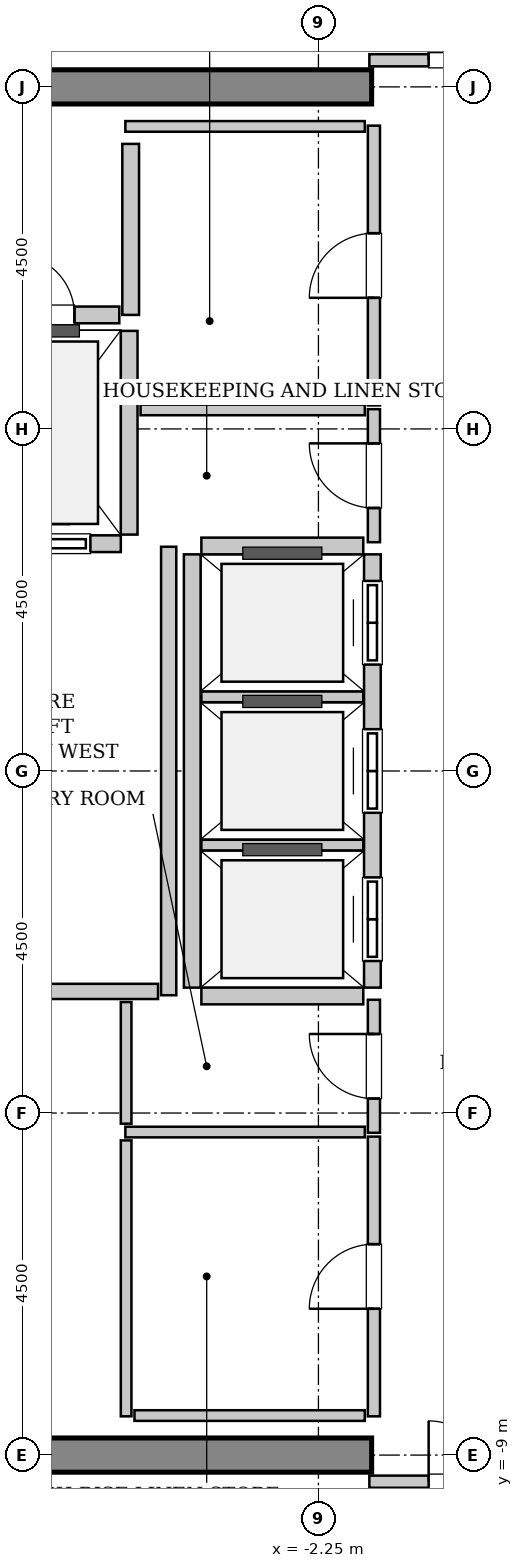
"""IFC4 building model, lengths in metres.
Left out: names, types, materials, properties, quantities, classifications, styles, units other than length and angle.
Written with IfcOpenShell. Run it as: python <this file> out.ifc"""

import sys

from ifc_helpers import new_model, si_unit, direction, frame, frame_2d, origin, place, context, subcontext, project, spatial, rectangle, extrude, source, transform, mapped, element, fill, save


model = new_model("IFC4")
c1 = context("Model", 3, precision=1e-05, world=origin(), true_north=direction((0.0, 1.0)))
c2 = subcontext(c1, "Body", "Model", "MODEL_VIEW")
j1 = project(units=[si_unit("LENGTHUNIT", "METRE"), si_unit("PLANEANGLEUNIT", "RADIAN")], contexts=[c1])
p1 = place(None, origin())
s1 = spatial("IfcSite", under=j1, at=p1, CompositionType="ELEMENT")
p2 = place(p1, origin())
s2 = spatial("IfcBuilding", under=s1, at=p2, CompositionType="ELEMENT")
p3 = place(p2, frame((0.0, 0.0, 279.8)))
s3 = spatial("IfcBuildingStorey", under=s2, at=p3, CompositionType="ELEMENT", Elevation=279.8)
m1 = source(origin(), c2, "Body", "SweptSolid", [
    extrude(rectangle(XDim=9.925, YDim=0.45, at=frame_2d((4.962, 0.0))), origin(), (0.0, 0.0, 1.0), 3.8),
])
for number, where, z_axis, x_axis in (
    (1, (-11.475, 9.0, 0.0), (0.0, 0.0, 1.0), (1.0, 0.0, 0.0)),
    (2, (-11.475, -9.0, 0.0), (0.0, 0.0, 1.0), (1.0, 0.0, 0.0)),
):
    element("IfcWall", number, at=place(p3, frame(where, z_axis=z_axis, x_axis=x_axis)), inside=s3, PredefinedType="SHEAR", context=c2, shape_type="MappedRepresentation", body=[
        mapped(m1, transform((0.0, 0.0, 0.0), x_axis=(1.0, 0.0, 0.0), y_axis=(0.0, 1.0, 0.0), z_axis=(0.0, 0.0, 1.0), scale=1.0)),
    ])
m2 = source(origin(), c2, "Body", "SweptSolid", [
    extrude(rectangle(XDim=2.0, YDim=0.22, at=frame_2d((1.0, 0.0))), origin(), (0.0, 0.0, 1.0), 3.535),
])
p4 = place(p3, frame((-6.85, 2.99, 0.0), z_axis=(0.0, 0.0, 1.0), x_axis=(1.0, 0.0, 0.0)))
e3 = element("IfcWall", 3, at=p4, inside=s3, PredefinedType="SOLIDWALL", context=c2, shape_type="MappedRepresentation", body=[
    mapped(m2, transform((0.0, 0.0, 0.0), x_axis=(1.0, 0.0, 0.0), y_axis=(0.0, 1.0, 0.0), z_axis=(0.0, 0.0, 1.0), scale=1.0)),
])
p5 = place(p4, frame((0.4, 0.0, 0.0)))
e4 = element("IfcOpeningElement", 4, at=p5, cuts=e3, PredefinedType="OPENING", context=c2, shape_type="SweptSolid", body=[
    extrude(rectangle(XDim=1.2, YDim=2.2, at=frame_2d((0.6, 1.1))), frame((0.0, 0.12, 0.0), z_axis=(0.0, -1.0, 0.0), x_axis=(1.0, 0.0, 0.0)), (0.0, 0.0, 1.0), 0.24),
])
m3 = source(origin(), c2, "Body", "SweptSolid", [
    extrude(rectangle(XDim=2.68, YDim=0.22, at=frame_2d((1.34, 0.0))), origin(), (0.0, 0.0, 1.0), 3.535),
])
p6 = place(p3, frame((-4.74, 3.11, 0.0), z_axis=(0.0, 0.0, 1.0), x_axis=(0.0, 1.0, 0.0)))
e5 = element("IfcWall", 5, at=p6, inside=s3, PredefinedType="SOLIDWALL", context=c2, shape_type="MappedRepresentation", body=[
    mapped(m3, transform((0.0, 0.0, 0.0), x_axis=(1.0, 0.0, 0.0), y_axis=(0.0, 1.0, 0.0), z_axis=(0.0, 0.0, 1.0), scale=1.0)),
])
m4 = source(origin(), c2, "Body", "SweptSolid", [
    extrude(rectangle(XDim=5.7, YDim=0.22, at=frame_2d((2.85, 0.0))), origin(), (0.0, 0.0, 1.0), 3.535),
])
p7 = place(p3, frame((-1.54, -2.85, 0.0), z_axis=(0.0, 0.0, 1.0), x_axis=(0.0, 1.0, 0.0)))
e6 = element("IfcWall", 6, at=p7, inside=s3, PredefinedType="SOLIDWALL", context=c2, shape_type="MappedRepresentation", body=[
    mapped(m4, transform((0.0, 0.0, 0.0), x_axis=(1.0, 0.0, 0.0), y_axis=(0.0, 1.0, 0.0), z_axis=(0.0, 0.0, 1.0), scale=1.0)),
])
p8 = place(p7, frame((0.35, 0.0, 0.0)))
e7 = element("IfcOpeningElement", 7, at=p8, cuts=e6, PredefinedType="OPENING", context=c2, shape_type="SweptSolid", body=[
    extrude(rectangle(XDim=1.1, YDim=2.2, at=frame_2d((0.55, 1.1))), frame((0.0, 0.12, 0.0), z_axis=(0.0, -1.0, 0.0), x_axis=(1.0, 0.0, 0.0)), (0.0, 0.0, 1.0), 0.24),
])
p9 = place(p7, frame((2.3, 0.0, 0.0)))
e8 = element("IfcOpeningElement", 8, at=p9, cuts=e6, PredefinedType="OPENING", context=c2, shape_type="SweptSolid", body=[
    extrude(rectangle(XDim=1.1, YDim=2.2, at=frame_2d((0.55, 1.1))), frame((0.0, 0.12, 0.0), z_axis=(0.0, -1.0, 0.0), x_axis=(1.0, 0.0, 0.0)), (0.0, 0.0, 1.0), 0.24),
])
p10 = place(p7, frame((4.25, 0.0, 0.0)))
e9 = element("IfcOpeningElement", 9, at=p10, cuts=e6, PredefinedType="OPENING", context=c2, shape_type="SweptSolid", body=[
    extrude(rectangle(XDim=1.1, YDim=2.2, at=frame_2d((0.55, 1.1))), frame((0.0, 0.12, 0.0), z_axis=(0.0, -1.0, 0.0), x_axis=(1.0, 0.0, 0.0)), (0.0, 0.0, 1.0), 0.24),
])
p11 = place(p3, frame((-3.91, 2.85, 0.0), z_axis=(0.0, 0.0, 1.0), x_axis=(0.0, -1.0, 0.0)))
e10 = element("IfcWall", 10, at=p11, inside=s3, PredefinedType="SOLIDWALL", context=c2, shape_type="MappedRepresentation", body=[
    mapped(m4, transform((0.0, 0.0, 0.0), x_axis=(1.0, 0.0, 0.0), y_axis=(0.0, 1.0, 0.0), z_axis=(0.0, 0.0, 1.0), scale=1.0)),
])
m5 = source(origin(), c2, "Body", "SweptSolid", [
    extrude(rectangle(XDim=2.13, YDim=0.22, at=frame_2d((1.065, 0.0))), origin(), (0.0, 0.0, 1.0), 3.535),
])
p12 = place(p3, frame((-3.79, -2.96, 0.0), z_axis=(0.0, 0.0, 1.0), x_axis=(1.0, 0.0, 0.0)))
e11 = element("IfcWall", 11, at=p12, inside=s3, PredefinedType="SOLIDWALL", context=c2, shape_type="MappedRepresentation", body=[
    mapped(m5, transform((0.0, 0.0, 0.0), x_axis=(1.0, 0.0, 0.0), y_axis=(0.0, 1.0, 0.0), z_axis=(0.0, 0.0, 1.0), scale=1.0)),
])
m6 = source(origin(), c2, "Body", "SweptSolid", [
    extrude(rectangle(XDim=2.13, YDim=0.14, at=frame_2d((1.065, 0.0))), origin(), (0.0, 0.0, 1.0), 3.535),
])
for number, where, z_axis, x_axis in (
    (12, (-3.79, -0.975, 0.0), (0.0, 0.0, 1.0), (1.0, 0.0, 0.0)),
    (13, (-3.79, 0.975, 0.0), (0.0, 0.0, 1.0), (1.0, 0.0, 0.0)),
):
    element("IfcWall", number, at=place(p3, frame(where, z_axis=z_axis, x_axis=x_axis)), inside=s3, PredefinedType="PARTITIONING", context=c2, shape_type="MappedRepresentation", body=[
        mapped(m6, transform((0.0, 0.0, 0.0), x_axis=(1.0, 0.0, 0.0), y_axis=(0.0, 1.0, 0.0), z_axis=(0.0, 0.0, 1.0), scale=1.0)),
    ])
p13 = place(p3, frame((-1.66, 2.96, 0.0), z_axis=(0.0, 0.0, 1.0), x_axis=(-1.0, 0.0, 0.0)))
e14 = element("IfcWall", 14, at=p13, inside=s3, PredefinedType="SOLIDWALL", context=c2, shape_type="MappedRepresentation", body=[
    mapped(m5, transform((0.0, 0.0, 0.0), x_axis=(1.0, 0.0, 0.0), y_axis=(0.0, 1.0, 0.0), z_axis=(0.0, 0.0, 1.0), scale=1.0)),
])
m7 = source(origin(), c2, "Body", "SweptSolid", [
    extrude(rectangle(XDim=2.25, YDim=0.22, at=frame_2d((1.125, 0.0))), origin(), (0.0, 0.0, 1.0), 3.535),
])
p14 = place(p3, frame((-4.72, 6.0, 0.0), z_axis=(0.0, 0.0, 1.0), x_axis=(0.0, 1.0, 0.0)))
e15 = element("IfcWall", 15, at=p14, inside=s3, PredefinedType="SOLIDWALL", context=c2, shape_type="MappedRepresentation", body=[
    mapped(m7, transform((0.0, 0.0, 0.0), x_axis=(1.0, 0.0, 0.0), y_axis=(0.0, 1.0, 0.0), z_axis=(0.0, 0.0, 1.0), scale=1.0)),
])
m8 = source(origin(), c2, "Body", "SweptSolid", [
    extrude(rectangle(XDim=1.98, YDim=0.22, at=frame_2d((0.99, 0.0))), origin(), (0.0, 0.0, 1.0), 3.535),
])
p15 = place(p3, frame((-6.85, 6.0, 0.0), z_axis=(0.0, 0.0, 1.0), x_axis=(1.0, 0.0, 0.0)))
e16 = element("IfcWall", 16, at=p15, inside=s3, PredefinedType="SOLIDWALL", context=c2, shape_type="MappedRepresentation", body=[
    mapped(m8, transform((0.0, 0.0, 0.0), x_axis=(1.0, 0.0, 0.0), y_axis=(0.0, 1.0, 0.0), z_axis=(0.0, 0.0, 1.0), scale=1.0)),
])
p16 = place(p15, frame((0.59, 0.0, 0.0)))
e17 = element("IfcOpeningElement", 17, at=p16, cuts=e16, PredefinedType="OPENING", context=c2, shape_type="SweptSolid", body=[
    extrude(rectangle(XDim=0.8, YDim=2.0, at=frame_2d((0.4, 1.0))), frame((0.0, 0.12, 0.0), z_axis=(0.0, -1.0, 0.0), x_axis=(1.0, 0.0, 0.0)), (0.0, 0.0, 1.0), 0.24),
])
m9 = source(origin(), c2, "Body", "SweptSolid", [
    extrude(rectangle(XDim=5.9, YDim=0.2, at=frame_2d((2.95, 0.0))), origin(), (0.0, 0.0, 1.0), 3.535),
])
p17 = place(p3, frame((-4.22, -2.95, 0.0), z_axis=(0.0, 0.0, 1.0), x_axis=(0.0, 1.0, 0.0)))
e18 = element("IfcWall", 18, at=p17, inside=s3, PredefinedType="PARTITIONING", context=c2, shape_type="MappedRepresentation", body=[
    mapped(m9, transform((0.0, 0.0, 0.0), x_axis=(1.0, 0.0, 0.0), y_axis=(0.0, 1.0, 0.0), z_axis=(0.0, 0.0, 1.0), scale=1.0)),
])
m10 = source(origin(), c2, "Body", "SweptSolid", [
    extrude(rectangle(XDim=2.9, YDim=0.2, at=frame_2d((1.45, 0.0))), origin(), (0.0, 0.0, 1.0), 3.535),
])
p18 = place(p3, frame((-7.26, -2.9, 0.0), z_axis=(0.0, 0.0, 1.0), x_axis=(1.0, 0.0, 0.0)))
e19 = element("IfcWall", 19, at=p18, inside=s3, PredefinedType="PARTITIONING", context=c2, shape_type="MappedRepresentation", body=[
    mapped(m10, transform((0.0, 0.0, 0.0), x_axis=(1.0, 0.0, 0.0), y_axis=(0.0, 1.0, 0.0), z_axis=(0.0, 0.0, 1.0), scale=1.0)),
])
m11 = source(origin(), c2, "Body", "SweptSolid", [
    extrude(rectangle(XDim=3.16, YDim=0.16, at=frame_2d((1.58, 0.0))), origin(), (0.0, 0.0, 1.0), 2.625),
])
p19 = place(p3, frame((-1.58, 9.35, 0.0), z_axis=(0.0, 0.0, 1.0), x_axis=(1.0, 0.0, 0.0)))
e20 = element("IfcWall", 20, at=p19, inside=s3, PredefinedType="PARTITIONING", context=c2, shape_type="MappedRepresentation", body=[
    mapped(m11, transform((0.0, 0.0, 0.0), x_axis=(1.0, 0.0, 0.0), y_axis=(0.0, 1.0, 0.0), z_axis=(0.0, 0.0, 1.0), scale=1.0)),
])
p20 = place(p19, frame((0.78, 0.0, 0.0)))
e21 = element("IfcOpeningElement", 21, at=p20, cuts=e20, PredefinedType="OPENING", context=c2, shape_type="SweptSolid", body=[
    extrude(rectangle(XDim=1.6, YDim=2.3, at=frame_2d((0.8, 1.15))), frame((0.0, 0.09, 0.0), z_axis=(0.0, -1.0, 0.0), x_axis=(1.0, 0.0, 0.0)), (0.0, 0.0, 1.0), 0.18),
])
p21 = place(p3, frame((-1.58, -9.35, 0.0), z_axis=(0.0, 0.0, 1.0), x_axis=(1.0, 0.0, 0.0)))
e22 = element("IfcWall", 22, at=p21, inside=s3, PredefinedType="PARTITIONING", context=c2, shape_type="MappedRepresentation", body=[
    mapped(m11, transform((0.0, 0.0, 0.0), x_axis=(1.0, 0.0, 0.0), y_axis=(0.0, 1.0, 0.0), z_axis=(0.0, 0.0, 1.0), scale=1.0)),
])
p22 = place(p21, frame((0.78, 0.0, 0.0)))
e23 = element("IfcOpeningElement", 23, at=p22, cuts=e22, PredefinedType="OPENING", context=c2, shape_type="SweptSolid", body=[
    extrude(rectangle(XDim=1.6, YDim=2.3, at=frame_2d((0.8, 1.15))), frame((0.0, 0.09, 0.0), z_axis=(0.0, -1.0, 0.0), x_axis=(1.0, 0.0, 0.0)), (0.0, 0.0, 1.0), 0.18),
])
m12 = source(origin(), c2, "Body", "SweptSolid", [
    extrude(rectangle(XDim=1.75, YDim=0.16, at=frame_2d((0.875, 0.0))), origin(), (0.0, 0.0, 1.0), 3.535),
])
p23 = place(p3, frame((-1.52, 3.01, 0.0), z_axis=(0.0, 0.0, 1.0), x_axis=(0.0, 1.0, 0.0)))
e24 = element("IfcWall", 24, at=p23, inside=s3, PredefinedType="PARTITIONING", context=c2, shape_type="MappedRepresentation", body=[
    mapped(m12, transform((0.0, 0.0, 0.0), x_axis=(1.0, 0.0, 0.0), y_axis=(0.0, 1.0, 0.0), z_axis=(0.0, 0.0, 1.0), scale=1.0)),
])
p24 = place(p23, frame((0.45, 0.0, 0.0)))
e25 = element("IfcOpeningElement", 25, at=p24, cuts=e24, PredefinedType="OPENING", context=c2, shape_type="SweptSolid", body=[
    extrude(rectangle(XDim=0.85, YDim=2.1, at=frame_2d((0.425, 1.05))), frame((0.0, 0.09, 0.0), z_axis=(0.0, -1.0, 0.0), x_axis=(1.0, 0.0, 0.0)), (0.0, 0.0, 1.0), 0.18),
])
m13 = source(origin(), c2, "Body", "SweptSolid", [
    extrude(rectangle(XDim=2.95, YDim=0.14, at=frame_2d((1.475, 0.0))), origin(), (0.0, 0.0, 1.0), 3.535),
])
p25 = place(p3, frame((-4.59, 4.75, 0.0), z_axis=(0.0, 0.0, 1.0), x_axis=(1.0, 0.0, 0.0)))
e26 = element("IfcWall", 26, at=p25, inside=s3, PredefinedType="PARTITIONING", context=c2, shape_type="MappedRepresentation", body=[
    mapped(m13, transform((0.0, 0.0, 0.0), x_axis=(1.0, 0.0, 0.0), y_axis=(0.0, 1.0, 0.0), z_axis=(0.0, 0.0, 1.0), scale=1.0)),
])
m14 = source(origin(), c2, "Body", "SweptSolid", [
    extrude(rectangle(XDim=3.68, YDim=0.16, at=frame_2d((1.84, 0.0))), origin(), (0.0, 0.0, 1.0), 3.535),
])
p26 = place(p3, frame((-1.52, 4.81, 0.0), z_axis=(0.0, 0.0, 1.0), x_axis=(0.0, 1.0, 0.0)))
e27 = element("IfcWall", 27, at=p26, inside=s3, PredefinedType="PARTITIONING", context=c2, shape_type="MappedRepresentation", body=[
    mapped(m14, transform((0.0, 0.0, 0.0), x_axis=(1.0, 0.0, 0.0), y_axis=(0.0, 1.0, 0.0), z_axis=(0.0, 0.0, 1.0), scale=1.0)),
])
p27 = place(p26, frame((1.415, 0.0, 0.0)))
e28 = element("IfcOpeningElement", 28, at=p27, cuts=e27, PredefinedType="OPENING", context=c2, shape_type="SweptSolid", body=[
    extrude(rectangle(XDim=0.85, YDim=2.1, at=frame_2d((0.425, 1.05))), frame((0.0, 0.09, 0.0), z_axis=(0.0, -1.0, 0.0), x_axis=(1.0, 0.0, 0.0)), (0.0, 0.0, 1.0), 0.18),
])
m15 = source(origin(), c2, "Body", "SweptSolid", [
    extrude(rectangle(XDim=3.15, YDim=0.14, at=frame_2d((1.575, 0.0))), origin(), (0.0, 0.0, 1.0), 3.535),
])
p28 = place(p3, frame((-4.79, 8.48, 0.0), z_axis=(0.0, 0.0, 1.0), x_axis=(1.0, 0.0, 0.0)))
e29 = element("IfcWall", 29, at=p28, inside=s3, PredefinedType="PARTITIONING", context=c2, shape_type="MappedRepresentation", body=[
    mapped(m15, transform((0.0, 0.0, 0.0), x_axis=(1.0, 0.0, 0.0), y_axis=(0.0, 1.0, 0.0), z_axis=(0.0, 0.0, 1.0), scale=1.0)),
])
p29 = place(p3, frame((-1.52, -4.76, 0.0), z_axis=(0.0, 0.0, 1.0), x_axis=(0.0, 1.0, 0.0)))
e30 = element("IfcWall", 30, at=p29, inside=s3, PredefinedType="PARTITIONING", context=c2, shape_type="MappedRepresentation", body=[
    mapped(m12, transform((0.0, 0.0, 0.0), x_axis=(1.0, 0.0, 0.0), y_axis=(0.0, 1.0, 0.0), z_axis=(0.0, 0.0, 1.0), scale=1.0)),
])
p30 = place(p29, frame((0.45, 0.0, 0.0)))
e31 = element("IfcOpeningElement", 31, at=p30, cuts=e30, PredefinedType="OPENING", context=c2, shape_type="SweptSolid", body=[
    extrude(rectangle(XDim=0.85, YDim=2.1, at=frame_2d((0.425, 1.05))), frame((0.0, 0.09, 0.0), z_axis=(0.0, -1.0, 0.0), x_axis=(1.0, 0.0, 0.0)), (0.0, 0.0, 1.0), 0.18),
])
p31 = place(p3, frame((-4.79, -4.75, 0.0), z_axis=(0.0, 0.0, 1.0), x_axis=(1.0, 0.0, 0.0)))
e32 = element("IfcWall", 32, at=p31, inside=s3, PredefinedType="PARTITIONING", context=c2, shape_type="MappedRepresentation", body=[
    mapped(m15, transform((0.0, 0.0, 0.0), x_axis=(1.0, 0.0, 0.0), y_axis=(0.0, 1.0, 0.0), z_axis=(0.0, 0.0, 1.0), scale=1.0)),
])
m16 = source(origin(), c2, "Body", "SweptSolid", [
    extrude(rectangle(XDim=1.6, YDim=0.14, at=frame_2d((0.8, 0.0))), origin(), (0.0, 0.0, 1.0), 3.535),
])
p32 = place(p3, frame((-4.78, -4.64, 0.0), z_axis=(0.0, 0.0, 1.0), x_axis=(0.0, 1.0, 0.0)))
e33 = element("IfcWall", 33, at=p32, inside=s3, PredefinedType="PARTITIONING", context=c2, shape_type="MappedRepresentation", body=[
    mapped(m16, transform((0.0, 0.0, 0.0), x_axis=(1.0, 0.0, 0.0), y_axis=(0.0, 1.0, 0.0), z_axis=(0.0, 0.0, 1.0), scale=1.0)),
])
p33 = place(p3, frame((-1.52, -8.49, 0.0), z_axis=(0.0, 0.0, 1.0), x_axis=(0.0, 1.0, 0.0)))
e34 = element("IfcWall", 34, at=p33, inside=s3, PredefinedType="PARTITIONING", context=c2, shape_type="MappedRepresentation", body=[
    mapped(m14, transform((0.0, 0.0, 0.0), x_axis=(1.0, 0.0, 0.0), y_axis=(0.0, 1.0, 0.0), z_axis=(0.0, 0.0, 1.0), scale=1.0)),
])
p34 = place(p33, frame((1.415, 0.0, 0.0)))
e35 = element("IfcOpeningElement", 35, at=p34, cuts=e34, PredefinedType="OPENING", context=c2, shape_type="SweptSolid", body=[
    extrude(rectangle(XDim=0.85, YDim=2.1, at=frame_2d((0.425, 1.05))), frame((0.0, 0.09, 0.0), z_axis=(0.0, -1.0, 0.0), x_axis=(1.0, 0.0, 0.0)), (0.0, 0.0, 1.0), 0.18),
])
m17 = source(origin(), c2, "Body", "SweptSolid", [
    extrude(rectangle(XDim=3.63, YDim=0.14, at=frame_2d((1.815, 0.0))), origin(), (0.0, 0.0, 1.0), 3.535),
])
p35 = place(p3, frame((-4.78, -8.49, 0.0), z_axis=(0.0, 0.0, 1.0), x_axis=(0.0, 1.0, 0.0)))
e36 = element("IfcWall", 36, at=p35, inside=s3, PredefinedType="PARTITIONING", context=c2, shape_type="MappedRepresentation", body=[
    mapped(m17, transform((0.0, 0.0, 0.0), x_axis=(1.0, 0.0, 0.0), y_axis=(0.0, 1.0, 0.0), z_axis=(0.0, 0.0, 1.0), scale=1.0)),
])
m18 = source(origin(), c2, "Body", "SweptSolid", [
    extrude(rectangle(XDim=3.03, YDim=0.14, at=frame_2d((1.515, 0.0))), origin(), (0.0, 0.0, 1.0), 3.535),
])
p36 = place(p3, frame((-4.67, -8.48, 0.0), z_axis=(0.0, 0.0, 1.0), x_axis=(1.0, 0.0, 0.0)))
e37 = element("IfcWall", 37, at=p36, inside=s3, PredefinedType="PARTITIONING", context=c2, shape_type="MappedRepresentation", body=[
    mapped(m18, transform((0.0, 0.0, 0.0), x_axis=(1.0, 0.0, 0.0), y_axis=(0.0, 1.0, 0.0), z_axis=(0.0, 0.0, 1.0), scale=1.0)),
])
m19 = source(origin(), c2, "Body", "SweptSolid", [
    extrude(rectangle(XDim=1.2, YDim=2.2, at=frame_2d((0.6, 1.1))), frame((0.0, 0.025, 0.0), z_axis=(0.0, -1.0, 0.0), x_axis=(1.0, 0.0, 0.0)), (0.0, 0.0, 1.0), 0.05),
])
p37 = place(p5, origin())
e38 = element("IfcDoor", 38, at=p37, inside=s3, OperationType="SLIDING_TO_LEFT", PredefinedType="DOOR", context=c2, shape_type="MappedRepresentation", body=[
    mapped(m19, transform((0.0, 0.0, 0.0), x_axis=(1.0, 0.0, 0.0), y_axis=(0.0, 1.0, 0.0), z_axis=(0.0, 0.0, 1.0), scale=1.0)),
])
fill(e4, e38)
m20 = source(origin(), c2, "Body", "SweptSolid", [
    extrude(rectangle(XDim=1.1, YDim=2.2, at=frame_2d((0.55, 1.1))), frame((0.0, 0.025, 0.0), z_axis=(0.0, -1.0, 0.0), x_axis=(1.0, 0.0, 0.0)), (0.0, 0.0, 1.0), 0.05),
])
p38 = place(p8, origin())
e39 = element("IfcDoor", 39, at=p38, inside=s3, OperationType="DOUBLE_DOOR_SLIDING", PredefinedType="DOOR", context=c2, shape_type="MappedRepresentation", body=[
    mapped(m20, transform((0.0, 0.0, 0.0), x_axis=(1.0, 0.0, 0.0), y_axis=(0.0, 1.0, 0.0), z_axis=(0.0, 0.0, 1.0), scale=1.0)),
])
fill(e7, e39)
p39 = place(p9, origin())
e40 = element("IfcDoor", 40, at=p39, inside=s3, OperationType="DOUBLE_DOOR_SLIDING", PredefinedType="DOOR", context=c2, shape_type="MappedRepresentation", body=[
    mapped(m20, transform((0.0, 0.0, 0.0), x_axis=(1.0, 0.0, 0.0), y_axis=(0.0, 1.0, 0.0), z_axis=(0.0, 0.0, 1.0), scale=1.0)),
])
fill(e8, e40)
p40 = place(p10, origin())
e41 = element("IfcDoor", 41, at=p40, inside=s3, OperationType="DOUBLE_DOOR_SLIDING", PredefinedType="DOOR", context=c2, shape_type="MappedRepresentation", body=[
    mapped(m20, transform((0.0, 0.0, 0.0), x_axis=(1.0, 0.0, 0.0), y_axis=(0.0, 1.0, 0.0), z_axis=(0.0, 0.0, 1.0), scale=1.0)),
])
fill(e9, e41)
m21 = source(origin(), c2, "Body", "SweptSolid", [
    extrude(rectangle(XDim=0.8, YDim=2.0, at=frame_2d((0.4, 1.0))), frame((0.0, 0.025, 0.0), z_axis=(0.0, -1.0, 0.0), x_axis=(1.0, 0.0, 0.0)), (0.0, 0.0, 1.0), 0.05),
])
p41 = place(p16, origin())
e42 = element("IfcDoor", 42, at=p41, inside=s3, OperationType="SINGLE_SWING_LEFT", PredefinedType="TRAPDOOR", context=c2, shape_type="MappedRepresentation", body=[
    mapped(m21, transform((0.0, 0.0, 0.0), x_axis=(1.0, 0.0, 0.0), y_axis=(0.0, 1.0, 0.0), z_axis=(0.0, 0.0, 1.0), scale=1.0)),
])
fill(e17, e42)
m22 = source(origin(), c2, "Body", "SweptSolid", [
    extrude(rectangle(XDim=1.6, YDim=2.3, at=frame_2d((0.8, 1.15))), frame((0.0, 0.025, 0.0), z_axis=(0.0, -1.0, 0.0), x_axis=(1.0, 0.0, 0.0)), (0.0, 0.0, 1.0), 0.05),
])
p42 = place(p20, origin())
e43 = element("IfcDoor", 43, at=p42, inside=s3, OperationType="DOUBLE_DOOR_SINGLE_SWING", PredefinedType="DOOR", context=c2, shape_type="MappedRepresentation", body=[
    mapped(m22, transform((0.0, 0.0, 0.0), x_axis=(1.0, 0.0, 0.0), y_axis=(0.0, 1.0, 0.0), z_axis=(0.0, 0.0, 1.0), scale=1.0)),
])
fill(e21, e43)
p43 = place(p22, origin())
e44 = element("IfcDoor", 44, at=p43, inside=s3, OperationType="DOUBLE_DOOR_SINGLE_SWING", PredefinedType="DOOR", context=c2, shape_type="MappedRepresentation", body=[
    mapped(m22, transform((0.0, 0.0, 0.0), x_axis=(1.0, 0.0, 0.0), y_axis=(0.0, 1.0, 0.0), z_axis=(0.0, 0.0, 1.0), scale=1.0)),
])
fill(e23, e44)
m23 = source(origin(), c2, "Body", "SweptSolid", [
    extrude(rectangle(XDim=0.85, YDim=2.1, at=frame_2d((0.425, 1.05))), frame((0.0, 0.025, 0.0), z_axis=(0.0, -1.0, 0.0), x_axis=(1.0, 0.0, 0.0)), (0.0, 0.0, 1.0), 0.05),
])
p44 = place(p24, origin())
e45 = element("IfcDoor", 45, at=p44, inside=s3, OperationType="SINGLE_SWING_RIGHT", PredefinedType="DOOR", context=c2, shape_type="MappedRepresentation", body=[
    mapped(m23, transform((0.0, 0.0, 0.0), x_axis=(1.0, 0.0, 0.0), y_axis=(0.0, 1.0, 0.0), z_axis=(0.0, 0.0, 1.0), scale=1.0)),
])
fill(e25, e45)
p45 = place(p27, origin())
e46 = element("IfcDoor", 46, at=p45, inside=s3, OperationType="SINGLE_SWING_LEFT", PredefinedType="DOOR", context=c2, shape_type="MappedRepresentation", body=[
    mapped(m23, transform((0.0, 0.0, 0.0), x_axis=(1.0, 0.0, 0.0), y_axis=(0.0, 1.0, 0.0), z_axis=(0.0, 0.0, 1.0), scale=1.0)),
])
fill(e28, e46)
p46 = place(p30, origin())
e47 = element("IfcDoor", 47, at=p46, inside=s3, OperationType="SINGLE_SWING_RIGHT", PredefinedType="DOOR", context=c2, shape_type="MappedRepresentation", body=[
    mapped(m23, transform((0.0, 0.0, 0.0), x_axis=(1.0, 0.0, 0.0), y_axis=(0.0, 1.0, 0.0), z_axis=(0.0, 0.0, 1.0), scale=1.0)),
])
fill(e31, e47)
p47 = place(p34, origin())
e48 = element("IfcDoor", 48, at=p47, inside=s3, OperationType="SINGLE_SWING_LEFT", PredefinedType="DOOR", context=c2, shape_type="MappedRepresentation", body=[
    mapped(m23, transform((0.0, 0.0, 0.0), x_axis=(1.0, 0.0, 0.0), y_axis=(0.0, 1.0, 0.0), z_axis=(0.0, 0.0, 1.0), scale=1.0)),
])
fill(e35, e48)
save(model, sys.argv[1])
